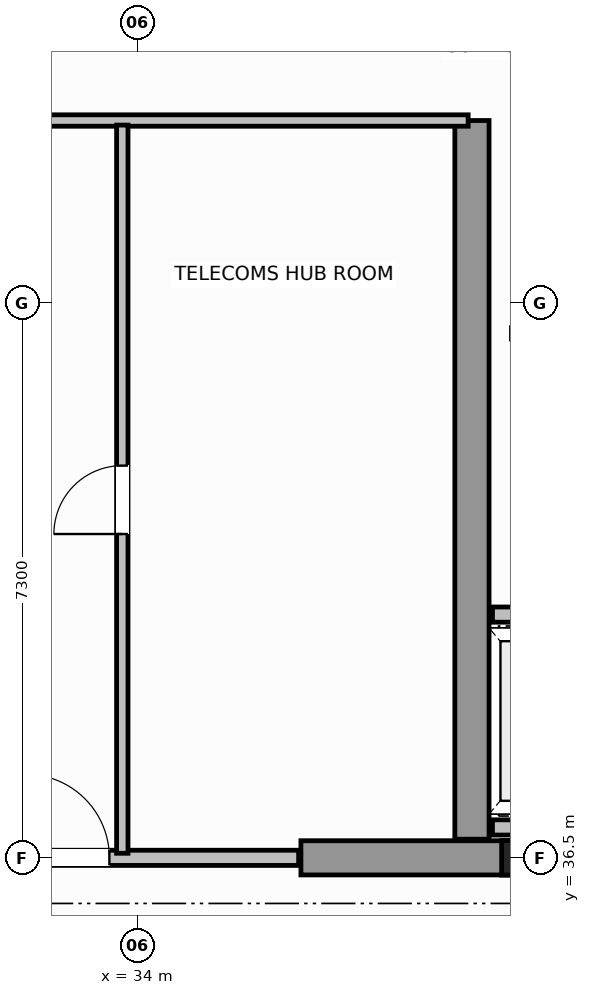
"""IFC4 building model, lengths in metres.
Left out: names, types, materials, properties, quantities, classifications, styles, units other than length and angle.
Written with IfcOpenShell. Run it as: python <this file> out.ifc"""

import sys

from ifc_helpers import new_model, si_unit, direction, frame, frame_2d, origin, origin_2d, place, context, subcontext, project, spatial, rectangle, i_section, extrude, source, transform, mapped, element, fill, save


model = new_model("IFC4")
c1 = context("Model", 3, precision=1e-05, world=origin(), true_north=direction((0.0, 1.0)))
c2 = subcontext(c1, "Body", "Model", "MODEL_VIEW")
j1 = project(units=[si_unit("LENGTHUNIT", "METRE"), si_unit("PLANEANGLEUNIT", "RADIAN")], contexts=[c1])
p1 = place(None, origin())
s1 = spatial("IfcSite", under=j1, at=p1, CompositionType="ELEMENT")
p2 = place(p1, origin())
s2 = spatial("IfcBuilding", under=s1, at=p2, CompositionType="ELEMENT")
p3 = place(p2, frame((0.0, 0.0, 257.4)))
s3 = spatial("IfcBuildingStorey", under=s2, at=p3, CompositionType="ELEMENT", Elevation=257.4)
m1 = source(origin(), c2, "Body", "SweptSolid", [
    extrude(i_section(OverallWidth=0.418, OverallDepth=0.455, WebThickness=0.042, FlangeThickness=0.058, FilletRadius=0.015, at=origin_2d()), origin(), (0.0, 0.0, 1.0), 3.8),
])
p4 = place(p3, frame((39.0, 36.5, 0.0), z_axis=(0.0, 0.0, 1.0), x_axis=(1.0, 0.0, 0.0)))
e1 = element("IfcColumn", 1, at=p4, inside=s3, PredefinedType="COLUMN", context=c2, shape_type="MappedRepresentation", body=[
    mapped(m1, transform((0.0, 0.0, 0.0), scale=1.0)),
])
p5 = place(p3, frame((36.15, 36.5, 0.0), z_axis=(0.0, 0.0, 1.0), x_axis=(1.0, 0.0, 0.0)))
e2 = element("IfcWall", 2, at=p5, inside=s3, PredefinedType="SHEAR", context=c2, shape_type="SweptSolid", body=[
    extrude(rectangle(XDim=4.5, YDim=0.45, at=frame_2d((2.25, 0.0))), origin(), (0.0, 0.0, 1.0), 3.8),
])
p6 = place(p3, frame((38.4, 36.745, 0.0), z_axis=(0.0, 0.0, 1.0), x_axis=(0.0, 1.0, 0.0)))
e3 = element("IfcWall", 3, at=p6, inside=s3, PredefinedType="SHEAR", context=c2, shape_type="SweptSolid", body=[
    extrude(rectangle(XDim=9.455, YDim=0.45, at=frame_2d((4.728, 0.0))), origin(), (0.0, 0.0, 1.0), 3.8),
])
p7 = place(p3, frame((38.67, 39.7, 0.0), z_axis=(0.0, 0.0, 1.0), x_axis=(1.0, 0.0, 0.0)))
e4 = element("IfcWall", 4, at=p7, inside=s3, PredefinedType="SOLIDWALL", context=c2, shape_type="SweptSolid", body=[
    extrude(rectangle(XDim=1.96, YDim=0.2, at=frame_2d((0.98, 0.0))), origin(), (0.0, 0.0, 1.0), 3.58),
])
p8 = place(p7, frame((0.43, 0.0, 0.0)))
e5 = element("IfcOpeningElement", 5, at=p8, cuts=e4, PredefinedType="OPENING", context=c2, shape_type="SweptSolid", body=[
    extrude(rectangle(XDim=1.1, YDim=2.15, at=frame_2d((0.55, 1.075))), frame((0.0, 0.11, 0.0), z_axis=(0.0, -1.0, 0.0), x_axis=(1.0, 0.0, 0.0)), (0.0, 0.0, 1.0), 0.22),
])
p9 = place(p3, frame((38.67, 36.9, 0.0), z_axis=(0.0, 0.0, 1.0), x_axis=(1.0, 0.0, 0.0)))
e6 = element("IfcWall", 6, at=p9, inside=s3, PredefinedType="SOLIDWALL", context=c2, shape_type="SweptSolid", body=[
    extrude(rectangle(XDim=1.96, YDim=0.2, at=frame_2d((0.98, 0.0))), origin(), (0.0, 0.0, 1.0), 3.58),
])
p10 = place(p3, frame((32.08, 36.5, 0.0), z_axis=(0.0, 0.0, 1.0), x_axis=(1.0, 0.0, 0.0)))
e7 = element("IfcWall", 7, at=p10, inside=s3, PredefinedType="SOLIDWALL", context=c2, shape_type="SweptSolid", body=[
    extrude(rectangle(XDim=4.04, YDim=0.2, at=frame_2d((2.02, 0.0))), origin(), (0.0, 0.0, 1.0), 3.02),
])
p11 = place(p10, frame((0.45, 0.0, 0.0)))
e8 = element("IfcOpeningElement", 8, at=p11, cuts=e7, PredefinedType="OPENING", context=c2, shape_type="SweptSolid", body=[
    extrude(rectangle(XDim=1.1, YDim=2.15, at=frame_2d((0.55, 1.075))), frame((0.0, 0.11, 0.0), z_axis=(0.0, -1.0, 0.0), x_axis=(1.0, 0.0, 0.0)), (0.0, 0.0, 1.0), 0.22),
])
p12 = place(p3, frame((29.85, 46.2, 0.0), z_axis=(0.0, 0.0, 1.0), x_axis=(1.0, 0.0, 0.0)))
e9 = element("IfcWall", 9, at=p12, inside=s3, PredefinedType="PARTITIONING", context=c2, shape_type="SweptSolid", body=[
    extrude(rectangle(XDim=8.5, YDim=0.15, at=frame_2d((4.25, 0.0))), origin(), (0.0, 0.0, 1.0), 3.58),
])
p13 = place(p3, frame((33.8, 36.56, 0.0), z_axis=(0.0, 0.0, 1.0), x_axis=(0.0, 1.0, 0.0)))
e10 = element("IfcWall", 10, at=p13, inside=s3, PredefinedType="PARTITIONING", context=c2, shape_type="SweptSolid", body=[
    extrude(rectangle(XDim=9.58, YDim=0.15, at=frame_2d((4.79, 0.0))), origin(), (0.0, 0.0, 1.0), 3.58),
])
p14 = place(p13, frame((4.2, 0.0, 0.0)))
e11 = element("IfcOpeningElement", 11, at=p14, cuts=e10, PredefinedType="OPENING", context=c2, shape_type="SweptSolid", body=[
    extrude(rectangle(XDim=0.9, YDim=2.1, at=frame_2d((0.45, 1.05))), frame((0.0, 0.085, 0.0), z_axis=(0.0, -1.0, 0.0), x_axis=(1.0, 0.0, 0.0)), (0.0, 0.0, 1.0), 0.17),
])
m2 = source(origin(), c2, "Body", "SweptSolid", [
    extrude(rectangle(XDim=1.1, YDim=2.15, at=frame_2d((0.55, 1.075))), frame((0.0, 0.025, 0.0), z_axis=(0.0, -1.0, 0.0), x_axis=(1.0, 0.0, 0.0)), (0.0, 0.0, 1.0), 0.05),
])
p15 = place(p11, origin())
e12 = element("IfcDoor", 12, at=p15, inside=s3, OperationType="SINGLE_SWING_LEFT", PredefinedType="DOOR", context=c2, shape_type="MappedRepresentation", body=[
    mapped(m2, transform((0.0, 0.0, 0.0), scale=1.0)),
])
fill(e8, e12)
m3 = source(origin(), c2, "Body", "SweptSolid", [
    extrude(rectangle(XDim=0.9, YDim=2.1, at=frame_2d((0.45, 1.05))), frame((0.0, 0.025, 0.0), z_axis=(0.0, -1.0, 0.0), x_axis=(1.0, 0.0, 0.0)), (0.0, 0.0, 1.0), 0.05),
])
p16 = place(p14, origin())
e13 = element("IfcDoor", 13, at=p16, inside=s3, OperationType="SINGLE_SWING_RIGHT", PredefinedType="DOOR", context=c2, shape_type="MappedRepresentation", body=[
    mapped(m3, transform((0.0, 0.0, 0.0), scale=1.0)),
])
fill(e11, e13)
save(model, sys.argv[1])
